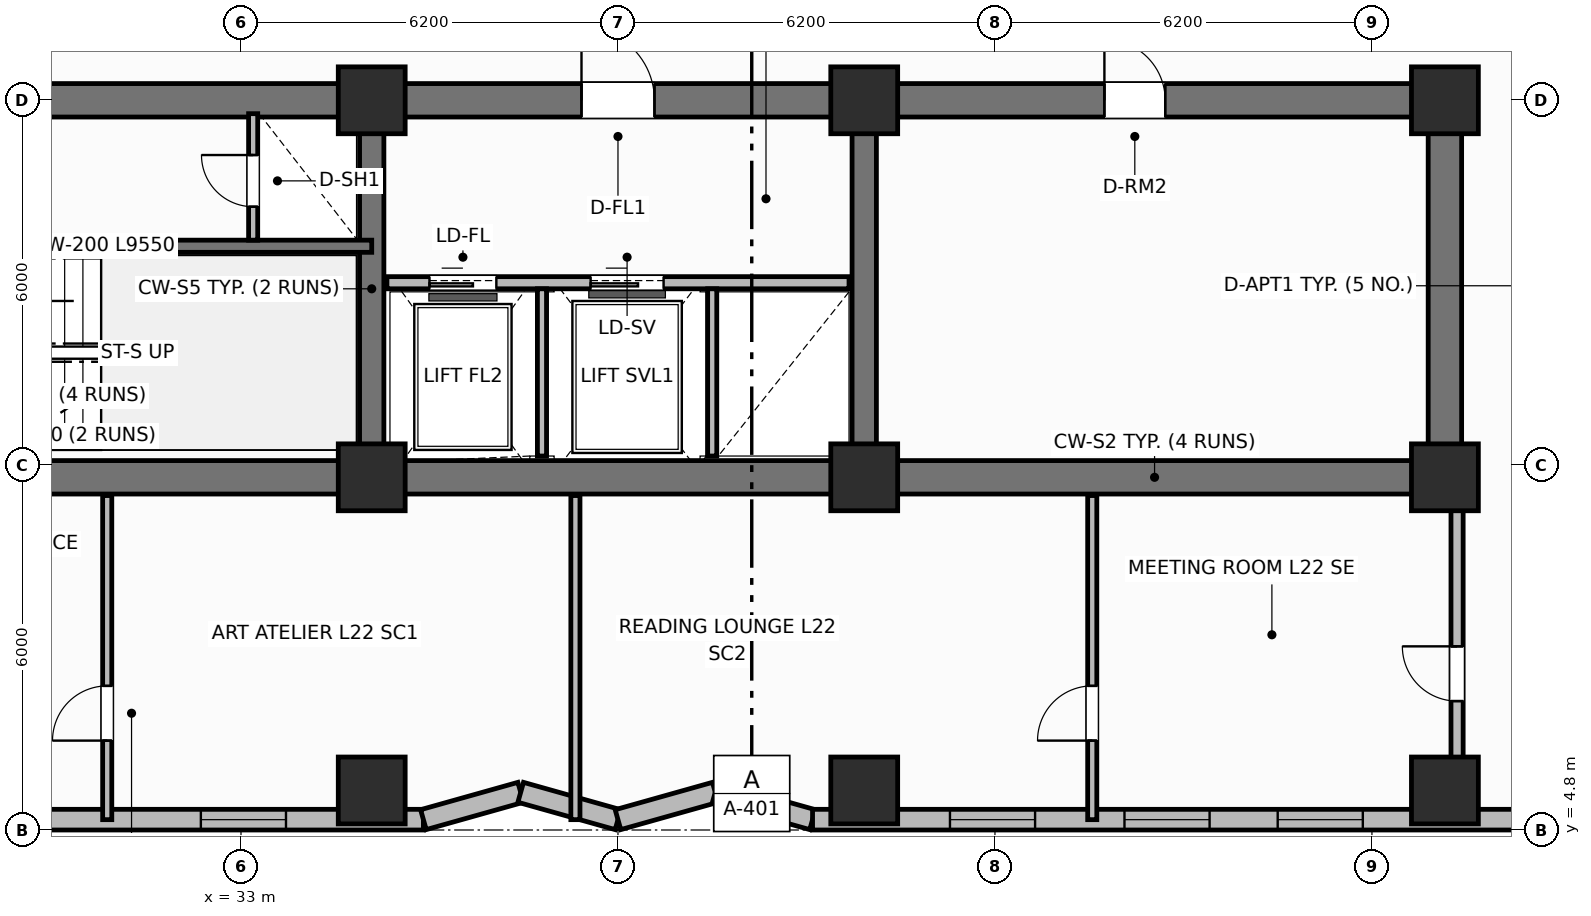
"""IFC4 building model, lengths in metres.
Left out: names, types, materials, properties, quantities, classifications, styles, units other than length and angle.
Written with IfcOpenShell. Run it as: python <this file> out.ifc"""

import sys

from ifc_helpers import new_model, si_unit, direction, frame, frame_2d, origin, origin_2d, place, context, subcontext, project, spatial, rectangle, extrude, element, fill, save


model = new_model("IFC4")
c1 = context("Model", 3, precision=1e-05, world=origin(), true_north=direction((0.0, 1.0)))
c2 = subcontext(c1, "Body", "Model", "MODEL_VIEW")
j1 = project(units=[si_unit("LENGTHUNIT", "METRE"), si_unit("PLANEANGLEUNIT", "RADIAN")], contexts=[c1])
p1 = place(None, origin())
s1 = spatial("IfcSite", under=j1, at=p1, CompositionType="ELEMENT")
p2 = place(p1, origin())
s2 = spatial("IfcBuilding", under=s1, at=p2, CompositionType="ELEMENT")
p3 = place(p2, frame((0.0, 0.0, 92.0)))
s3 = spatial("IfcBuildingStorey", under=s2, at=p3, CompositionType="ELEMENT", Elevation=92.0)
p4 = place(p3, frame((52.8, 10.6, 0.0), z_axis=(0.0, 0.0, 1.0), x_axis=(-1.0, 0.0, 0.0)))
e1 = element("IfcWall", 1, at=p4, inside=s3, PredefinedType="SHEAR", context=c2, shape_type="SweptSolid", body=[
    extrude(rectangle(XDim=27.2, YDim=0.55, at=frame_2d((13.6, 0.0))), origin(), (0.0, 0.0, 1.0), 3.7),
])
p5 = place(p3, frame((52.8, 10.875, 0.0), z_axis=(0.0, 0.0, 1.0), x_axis=(0.0, 1.0, 0.0)))
e2 = element("IfcWall", 2, at=p5, inside=s3, PredefinedType="SHEAR", context=c2, shape_type="SweptSolid", body=[
    extrude(rectangle(XDim=5.65, YDim=0.55, at=frame_2d((2.825, 0.0))), origin(), (0.0, 0.0, 1.0), 3.7),
])
p6 = place(p3, frame((25.6, 16.8, 0.0), z_axis=(0.0, 0.0, 1.0), x_axis=(1.0, 0.0, 0.0)))
e3 = element("IfcWall", 3, at=p6, inside=s3, PredefinedType="SHEAR", context=c2, shape_type="SweptSolid", body=[
    extrude(rectangle(XDim=27.2, YDim=0.55, at=frame_2d((13.6, 0.0))), origin(), (0.0, 0.0, 1.0), 3.7),
])
p7 = place(p6, frame((1.9, 0.0, 0.0)))
e4 = element("IfcOpeningElement", 4, at=p7, cuts=e3, PredefinedType="OPENING", context=c2, shape_type="SweptSolid", body=[
    extrude(rectangle(XDim=1.1, YDim=2.15, at=frame_2d((0.55, 1.075))), frame((0.0, 0.285, 0.0), z_axis=(0.0, -1.0, 0.0), x_axis=(1.0, 0.0, 0.0)), (0.0, 0.0, 1.0), 0.57),
])
p8 = place(p6, frame((13.0, 0.0, 0.0)))
e5 = element("IfcOpeningElement", 5, at=p8, cuts=e3, PredefinedType="OPENING", context=c2, shape_type="SweptSolid", body=[
    extrude(rectangle(XDim=1.2, YDim=2.15, at=frame_2d((0.6, 1.075))), frame((0.0, 0.285, 0.0), z_axis=(0.0, -1.0, 0.0), x_axis=(1.0, 0.0, 0.0)), (0.0, 0.0, 1.0), 0.57),
])
p9 = place(p6, frame((21.6, 0.0, 0.0)))
e6 = element("IfcOpeningElement", 6, at=p9, cuts=e3, PredefinedType="OPENING", context=c2, shape_type="SweptSolid", body=[
    extrude(rectangle(XDim=1.0, YDim=2.15, at=frame_2d((0.5, 1.075))), frame((0.0, 0.285, 0.0), z_axis=(0.0, -1.0, 0.0), x_axis=(1.0, 0.0, 0.0)), (0.0, 0.0, 1.0), 0.57),
])
for number, where, z_axis, x_axis in (
    (7, (35.15, 10.875, 0.0), (0.0, 0.0, 1.0), (0.0, 1.0, 0.0)),
    (8, (43.25, 10.875, 0.0), (0.0, 0.0, 1.0), (0.0, 1.0, 0.0)),
):
    element("IfcWall", number, at=place(p3, frame(where, z_axis=z_axis, x_axis=x_axis)), inside=s3, PredefinedType="SHEAR", context=c2, shape_type="SweptSolid", body=[
        extrude(rectangle(XDim=5.65, YDim=0.4, at=frame_2d((2.825, 0.0))), origin(), (0.0, 0.0, 1.0), 3.7),
    ])
for number, where, z_axis, x_axis in (
    (9, (35.15, 10.6, 0.0), (0.0, 0.0, 1.0), (1.0, 0.0, 0.0)),
    (10, (35.15, 16.8, 0.0), (0.0, 0.0, 1.0), (1.0, 0.0, 0.0)),
    (11, (43.25, 10.6, 0.0), (0.0, 0.0, 1.0), (1.0, 0.0, 0.0)),
    (12, (43.25, 16.8, 0.0), (0.0, 0.0, 1.0), (1.0, 0.0, 0.0)),
    (13, (52.8, 10.6, 0.0), (0.0, 0.0, 1.0), (1.0, 0.0, 0.0)),
    (14, (52.8, 16.8, 0.0), (0.0, 0.0, 1.0), (1.0, 0.0, 0.0)),
    (15, (35.15, 5.45, 0.0), (0.0, 0.0, 1.0), (1.0, 0.0, 0.0)),
    (16, (43.25, 5.45, 0.0), (0.0, 0.0, 1.0), (1.0, 0.0, 0.0)),
    (17, (52.8, 5.45, 0.0), (0.0, 0.0, 1.0), (1.0, 0.0, 0.0)),
):
    element("IfcColumn", number, at=place(p3, frame(where, z_axis=z_axis, x_axis=x_axis)), inside=s3, PredefinedType="COLUMN", context=c2, shape_type="SweptSolid", body=[
        extrude(rectangle(XDim=1.1, YDim=1.1, at=origin_2d()), origin(), (0.0, 0.0, 1.0), 3.7),
    ])
p10 = place(p3, frame((18.6, 4.97, 0.0), z_axis=(0.0, 0.0, 1.0), x_axis=(1.0, 0.0, 0.0)))
e18 = element("IfcWall", 18, at=p10, inside=s3, PredefinedType="SOLIDWALL", context=c2, shape_type="SweptSolid", body=[
    extrude(rectangle(XDim=17.4, YDim=0.34, at=frame_2d((8.7, 0.0))), origin(), (0.0, 0.0, 1.0), 2.7),
])
p11 = place(p10, frame((1.56, 0.0, 0.73)))
e19 = element("IfcOpeningElement", 19, at=p11, cuts=e18, PredefinedType="OPENING", context=c2, shape_type="SweptSolid", body=[
    extrude(rectangle(XDim=1.4, YDim=1.85, at=frame_2d((0.7, 0.925))), frame((0.0, 0.18, 0.0), z_axis=(0.0, -1.0, 0.0), x_axis=(1.0, 0.0, 0.0)), (0.0, 0.0, 1.0), 0.36),
])
p12 = place(p10, frame((8.35, 0.0, 0.73)))
e20 = element("IfcOpeningElement", 20, at=p12, cuts=e18, PredefinedType="OPENING", context=c2, shape_type="SweptSolid", body=[
    extrude(rectangle(XDim=1.4, YDim=1.85, at=frame_2d((0.7, 0.925))), frame((0.0, 0.18, 0.0), z_axis=(0.0, -1.0, 0.0), x_axis=(1.0, 0.0, 0.0)), (0.0, 0.0, 1.0), 0.36),
])
p13 = place(p10, frame((13.74, 0.0, 0.73)))
e21 = element("IfcOpeningElement", 21, at=p13, cuts=e18, PredefinedType="OPENING", context=c2, shape_type="SweptSolid", body=[
    extrude(rectangle(XDim=1.4, YDim=1.85, at=frame_2d((0.7, 0.925))), frame((0.0, 0.18, 0.0), z_axis=(0.0, -1.0, 0.0), x_axis=(1.0, 0.0, 0.0)), (0.0, 0.0, 1.0), 0.36),
])
p14 = place(p3, frame((36.0, 4.97, 0.0), z_axis=(0.0, 0.0, 1.0), x_axis=(0.962662902433, 0.270703040766, 0.0)))
e22 = element("IfcWall", 22, at=p14, inside=s3, PredefinedType="SOLIDWALL", context=c2, shape_type="SweptSolid", body=[
    extrude(rectangle(XDim=1.662, YDim=0.34, at=frame_2d((0.831, 0.0))), origin(), (0.0, 0.0, 1.0), 2.7),
])
p15 = place(p3, frame((37.6, 5.42, 0.0), z_axis=(0.0, 0.0, 1.0), x_axis=(0.962652136636, -0.270741322725, 0.0)))
e23 = element("IfcWall", 23, at=p15, inside=s3, PredefinedType="SOLIDWALL", context=c2, shape_type="SweptSolid", body=[
    extrude(rectangle(XDim=1.662, YDim=0.34, at=frame_2d((0.831, 0.0))), origin(), (0.0, 0.0, 1.0), 2.7),
])
p16 = place(p3, frame((39.2, 4.97, 0.0), z_axis=(0.0, 0.0, 1.0), x_axis=(0.962662902433, 0.270703040766, 0.0)))
e24 = element("IfcWall", 24, at=p16, inside=s3, PredefinedType="SOLIDWALL", context=c2, shape_type="SweptSolid", body=[
    extrude(rectangle(XDim=1.662, YDim=0.34, at=frame_2d((0.831, 0.0))), origin(), (0.0, 0.0, 1.0), 2.7),
])
p17 = place(p3, frame((40.8, 5.42, 0.0), z_axis=(0.0, 0.0, 1.0), x_axis=(0.962652136636, -0.270741322725, 0.0)))
e25 = element("IfcWall", 25, at=p17, inside=s3, PredefinedType="SOLIDWALL", context=c2, shape_type="SweptSolid", body=[
    extrude(rectangle(XDim=1.662, YDim=0.34, at=frame_2d((0.831, 0.0))), origin(), (0.0, 0.0, 1.0), 2.7),
])
p18 = place(p3, frame((42.4, 4.97, 0.0), z_axis=(0.0, 0.0, 1.0), x_axis=(1.0, 0.0, 0.0)))
e26 = element("IfcWall", 26, at=p18, inside=s3, PredefinedType="SOLIDWALL", context=c2, shape_type="SweptSolid", body=[
    extrude(rectangle(XDim=17.4, YDim=0.34, at=frame_2d((8.7, 0.0))), origin(), (0.0, 0.0, 1.0), 2.7),
])
p19 = place(p18, frame((2.26, 0.0, 0.73)))
e27 = element("IfcOpeningElement", 27, at=p19, cuts=e26, PredefinedType="OPENING", context=c2, shape_type="SweptSolid", body=[
    extrude(rectangle(XDim=1.4, YDim=1.85, at=frame_2d((0.7, 0.925))), frame((0.0, 0.18, 0.0), z_axis=(0.0, -1.0, 0.0), x_axis=(1.0, 0.0, 0.0)), (0.0, 0.0, 1.0), 0.36),
])
p20 = place(p18, frame((5.13, 0.0, 0.73)))
e28 = element("IfcOpeningElement", 28, at=p20, cuts=e26, PredefinedType="OPENING", context=c2, shape_type="SweptSolid", body=[
    extrude(rectangle(XDim=1.4, YDim=1.85, at=frame_2d((0.7, 0.925))), frame((0.0, 0.18, 0.0), z_axis=(0.0, -1.0, 0.0), x_axis=(1.0, 0.0, 0.0)), (0.0, 0.0, 1.0), 0.36),
])
p21 = place(p18, frame((7.65, 0.0, 0.73)))
e29 = element("IfcOpeningElement", 29, at=p21, cuts=e26, PredefinedType="OPENING", context=c2, shape_type="SweptSolid", body=[
    extrude(rectangle(XDim=1.4, YDim=1.85, at=frame_2d((0.7, 0.925))), frame((0.0, 0.18, 0.0), z_axis=(0.0, -1.0, 0.0), x_axis=(1.0, 0.0, 0.0)), (0.0, 0.0, 1.0), 0.36),
])
p22 = place(p18, frame((14.44, 0.0, 0.73)))
e30 = element("IfcOpeningElement", 30, at=p22, cuts=e26, PredefinedType="OPENING", context=c2, shape_type="SweptSolid", body=[
    extrude(rectangle(XDim=1.4, YDim=1.85, at=frame_2d((0.7, 0.925))), frame((0.0, 0.18, 0.0), z_axis=(0.0, -1.0, 0.0), x_axis=(1.0, 0.0, 0.0)), (0.0, 0.0, 1.0), 0.36),
])
p23 = place(p3, frame((25.6, 14.4, 0.0), z_axis=(0.0, 0.0, 1.0), x_axis=(1.0, 0.0, 0.0)))
e31 = element("IfcWall", 31, at=p23, inside=s3, PredefinedType="SHEAR", context=c2, shape_type="SweptSolid", body=[
    extrude(rectangle(XDim=9.55, YDim=0.2, at=frame_2d((4.775, 0.0))), origin(), (0.0, 0.0, 1.0), 3.7),
])
p24 = place(p23, frame((1.05, 0.0, 0.0)))
e32 = element("IfcOpeningElement", 32, at=p24, cuts=e31, PredefinedType="OPENING", context=c2, shape_type="SweptSolid", body=[
    extrude(rectangle(XDim=1.1, YDim=2.15, at=frame_2d((0.55, 1.075))), frame((0.0, 0.11, 0.0), z_axis=(0.0, -1.0, 0.0), x_axis=(1.0, 0.0, 0.0)), (0.0, 0.0, 1.0), 0.22),
])
p25 = place(p3, frame((33.2, 14.5, 0.0), z_axis=(0.0, 0.0, 1.0), x_axis=(0.0, 1.0, 0.0)))
e33 = element("IfcWall", 33, at=p25, inside=s3, PredefinedType="PARTITIONING", context=c2, shape_type="SweptSolid", body=[
    extrude(rectangle(XDim=2.08, YDim=0.15, at=frame_2d((1.04, 0.0))), origin(), (0.0, 0.0, 1.0), 2.53),
])
p26 = place(p25, frame((0.55, 0.0, 0.0)))
e34 = element("IfcOpeningElement", 34, at=p26, cuts=e33, PredefinedType="OPENING", context=c2, shape_type="SweptSolid", body=[
    extrude(rectangle(XDim=0.85, YDim=2.05, at=frame_2d((0.425, 1.025))), frame((0.0, 0.085, 0.0), z_axis=(0.0, -1.0, 0.0), x_axis=(1.0, 0.0, 0.0)), (0.0, 0.0, 1.0), 0.17),
])
p27 = place(p3, frame((35.4, 13.8, 0.0), z_axis=(0.0, 0.0, 1.0), x_axis=(1.0, 0.0, 0.0)))
e35 = element("IfcWall", 35, at=p27, inside=s3, PredefinedType="PARTITIONING", context=c2, shape_type="SweptSolid", body=[
    extrude(rectangle(XDim=7.6, YDim=0.2, at=frame_2d((3.8, 0.0))), origin(), (0.0, 0.0, 1.0), 2.3),
])
p28 = place(p27, frame((0.7, 0.0, 0.0)))
e36 = element("IfcOpeningElement", 36, at=p28, cuts=e35, PredefinedType="OPENING", context=c2, shape_type="SweptSolid", body=[
    extrude(rectangle(XDim=1.1, YDim=2.15, at=frame_2d((0.55, 1.075))), frame((0.0, 0.11, 0.0), z_axis=(0.0, -1.0, 0.0), x_axis=(1.0, 0.0, 0.0)), (0.0, 0.0, 1.0), 0.22),
])
p29 = place(p27, frame((3.35, 0.0, 0.0)))
e37 = element("IfcOpeningElement", 37, at=p29, cuts=e35, PredefinedType="OPENING", context=c2, shape_type="SweptSolid", body=[
    extrude(rectangle(XDim=1.2, YDim=2.15, at=frame_2d((0.6, 1.075))), frame((0.0, 0.11, 0.0), z_axis=(0.0, -1.0, 0.0), x_axis=(1.0, 0.0, 0.0)), (0.0, 0.0, 1.0), 0.22),
])
for number, where, z_axis, x_axis in (
    (38, (37.95, 10.95, 0.0), (0.0, 0.0, 1.0), (0.0, 1.0, 0.0)),
    (39, (40.75, 10.95, 0.0), (0.0, 0.0, 1.0), (0.0, 1.0, 0.0)),
):
    element("IfcWall", number, at=place(p3, frame(where, z_axis=z_axis, x_axis=x_axis)), inside=s3, PredefinedType="PARTITIONING", context=c2, shape_type="SweptSolid", body=[
        extrude(rectangle(XDim=2.75, YDim=0.15, at=frame_2d((1.375, 0.0))), origin(), (0.0, 0.0, 1.0), 2.53),
    ])
p30 = place(p3, frame((30.8, 4.97, 0.0), z_axis=(0.0, 0.0, 1.0), x_axis=(0.0, 1.0, 0.0)))
e40 = element("IfcWall", 40, at=p30, inside=s3, PredefinedType="PARTITIONING", context=c2, shape_type="SweptSolid", body=[
    extrude(rectangle(XDim=5.33, YDim=0.15, at=frame_2d((2.665, 0.0))), origin(), (0.0, 0.0, 1.0), 2.53),
])
p31 = place(p30, frame((1.3, 0.0, 0.0)))
e41 = element("IfcOpeningElement", 41, at=p31, cuts=e40, PredefinedType="OPENING", context=c2, shape_type="SweptSolid", body=[
    extrude(rectangle(XDim=0.9, YDim=2.1, at=frame_2d((0.45, 1.05))), frame((0.0, 0.085, 0.0), z_axis=(0.0, -1.0, 0.0), x_axis=(1.0, 0.0, 0.0)), (0.0, 0.0, 1.0), 0.17),
])
p32 = place(p3, frame((38.5, 4.97, 0.0), z_axis=(0.0, 0.0, 1.0), x_axis=(0.0, 1.0, 0.0)))
e42 = element("IfcWall", 42, at=p32, inside=s3, PredefinedType="PARTITIONING", context=c2, shape_type="SweptSolid", body=[
    extrude(rectangle(XDim=5.33, YDim=0.15, at=frame_2d((2.665, 0.0))), origin(), (0.0, 0.0, 1.0), 2.53),
])
p33 = place(p3, frame((47.0, 4.97, 0.0), z_axis=(0.0, 0.0, 1.0), x_axis=(0.0, 1.0, 0.0)))
e43 = element("IfcWall", 43, at=p33, inside=s3, PredefinedType="PARTITIONING", context=c2, shape_type="SweptSolid", body=[
    extrude(rectangle(XDim=5.33, YDim=0.15, at=frame_2d((2.665, 0.0))), origin(), (0.0, 0.0, 1.0), 2.53),
])
p34 = place(p33, frame((1.3, 0.0, 0.0)))
e44 = element("IfcOpeningElement", 44, at=p34, cuts=e43, PredefinedType="OPENING", context=c2, shape_type="SweptSolid", body=[
    extrude(rectangle(XDim=0.9, YDim=2.1, at=frame_2d((0.45, 1.05))), frame((0.0, 0.085, 0.0), z_axis=(0.0, -1.0, 0.0), x_axis=(1.0, 0.0, 0.0)), (0.0, 0.0, 1.0), 0.17),
])
p35 = place(p3, frame((53.0, 5.62, 0.0), z_axis=(0.0, 0.0, 1.0), x_axis=(0.0, 1.0, 0.0)))
e45 = element("IfcWall", 45, at=p35, inside=s3, PredefinedType="PARTITIONING", context=c2, shape_type="SweptSolid", body=[
    extrude(rectangle(XDim=4.68, YDim=0.2, at=frame_2d((2.34, 0.0))), origin(), (0.0, 0.0, 1.0), 2.53),
])
p36 = place(p35, frame((1.3, 0.0, 0.0)))
e46 = element("IfcOpeningElement", 46, at=p36, cuts=e45, PredefinedType="OPENING", context=c2, shape_type="SweptSolid", body=[
    extrude(rectangle(XDim=0.9, YDim=2.1, at=frame_2d((0.45, 1.05))), frame((0.0, 0.11, 0.0), z_axis=(0.0, -1.0, 0.0), x_axis=(1.0, 0.0, 0.0)), (0.0, 0.0, 1.0), 0.22),
])
p37 = place(p13, origin())
e47 = element("IfcWindow", 47, at=p37, inside=s3, PartitioningType="SINGLE_PANEL", PredefinedType="WINDOW", context=c2, shape_type="SweptSolid", body=[
    extrude(rectangle(XDim=1.4, YDim=1.85, at=frame_2d((0.7, 0.925))), frame((0.0, 0.03, 0.0), z_axis=(0.0, -1.0, 0.0), x_axis=(1.0, 0.0, 0.0)), (0.0, 0.0, 1.0), 0.06),
])
fill(e21, e47)
p38 = place(p19, origin())
e48 = element("IfcWindow", 48, at=p38, inside=s3, PartitioningType="SINGLE_PANEL", PredefinedType="WINDOW", context=c2, shape_type="SweptSolid", body=[
    extrude(rectangle(XDim=1.4, YDim=1.85, at=frame_2d((0.7, 0.925))), frame((0.0, 0.03, 0.0), z_axis=(0.0, -1.0, 0.0), x_axis=(1.0, 0.0, 0.0)), (0.0, 0.0, 1.0), 0.06),
])
fill(e27, e48)
p39 = place(p20, origin())
e49 = element("IfcWindow", 49, at=p39, inside=s3, PartitioningType="SINGLE_PANEL", PredefinedType="WINDOW", context=c2, shape_type="SweptSolid", body=[
    extrude(rectangle(XDim=1.4, YDim=1.85, at=frame_2d((0.7, 0.925))), frame((0.0, 0.03, 0.0), z_axis=(0.0, -1.0, 0.0), x_axis=(1.0, 0.0, 0.0)), (0.0, 0.0, 1.0), 0.06),
])
fill(e28, e49)
p40 = place(p21, origin())
e50 = element("IfcWindow", 50, at=p40, inside=s3, PartitioningType="SINGLE_PANEL", PredefinedType="WINDOW", context=c2, shape_type="SweptSolid", body=[
    extrude(rectangle(XDim=1.4, YDim=1.85, at=frame_2d((0.7, 0.925))), frame((0.0, 0.03, 0.0), z_axis=(0.0, -1.0, 0.0), x_axis=(1.0, 0.0, 0.0)), (0.0, 0.0, 1.0), 0.06),
])
fill(e29, e50)
p41 = place(p26, origin())
e51 = element("IfcDoor", 51, at=p41, inside=s3, OperationType="SINGLE_SWING_RIGHT", PredefinedType="TRAPDOOR", context=c2, shape_type="SweptSolid", body=[
    extrude(rectangle(XDim=0.85, YDim=2.05, at=frame_2d((0.425, 1.025))), frame((0.0, 0.025, 0.0), z_axis=(0.0, -1.0, 0.0), x_axis=(1.0, 0.0, 0.0)), (0.0, 0.0, 1.0), 0.05),
])
fill(e34, e51)
p42 = place(p28, origin())
e52 = element("IfcDoor", 52, at=p42, inside=s3, OperationType="SLIDING_TO_LEFT", PredefinedType="DOOR", context=c2, shape_type="SweptSolid", body=[
    extrude(rectangle(XDim=1.1, YDim=2.15, at=frame_2d((0.55, 1.075))), frame((0.0, 0.025, 0.0), z_axis=(0.0, -1.0, 0.0), x_axis=(1.0, 0.0, 0.0)), (0.0, 0.0, 1.0), 0.05),
])
fill(e36, e52)
p43 = place(p29, origin())
e53 = element("IfcDoor", 53, at=p43, inside=s3, OperationType="SLIDING_TO_LEFT", PredefinedType="DOOR", context=c2, shape_type="SweptSolid", body=[
    extrude(rectangle(XDim=1.2, YDim=2.15, at=frame_2d((0.6, 1.075))), frame((0.0, 0.025, 0.0), z_axis=(0.0, -1.0, 0.0), x_axis=(1.0, 0.0, 0.0)), (0.0, 0.0, 1.0), 0.05),
])
fill(e37, e53)
p44 = place(p31, origin())
e54 = element("IfcDoor", 54, at=p44, inside=s3, OperationType="SINGLE_SWING_LEFT", PredefinedType="DOOR", context=c2, shape_type="SweptSolid", body=[
    extrude(rectangle(XDim=0.9, YDim=2.1, at=frame_2d((0.45, 1.05))), frame((0.0, 0.025, 0.0), z_axis=(0.0, -1.0, 0.0), x_axis=(1.0, 0.0, 0.0)), (0.0, 0.0, 1.0), 0.05),
])
fill(e41, e54)
p45 = place(p34, origin())
e55 = element("IfcDoor", 55, at=p45, inside=s3, OperationType="SINGLE_SWING_LEFT", PredefinedType="DOOR", context=c2, shape_type="SweptSolid", body=[
    extrude(rectangle(XDim=0.9, YDim=2.1, at=frame_2d((0.45, 1.05))), frame((0.0, 0.025, 0.0), z_axis=(0.0, -1.0, 0.0), x_axis=(1.0, 0.0, 0.0)), (0.0, 0.0, 1.0), 0.05),
])
fill(e44, e55)
p46 = place(p36, origin())
e56 = element("IfcDoor", 56, at=p46, inside=s3, OperationType="SINGLE_SWING_RIGHT", PredefinedType="DOOR", context=c2, shape_type="SweptSolid", body=[
    extrude(rectangle(XDim=0.9, YDim=2.1, at=frame_2d((0.45, 1.05))), frame((0.0, 0.025, 0.0), z_axis=(0.0, -1.0, 0.0), x_axis=(1.0, 0.0, 0.0)), (0.0, 0.0, 1.0), 0.05),
])
fill(e46, e56)
p47 = place(p8, origin())
e57 = element("IfcDoor", 57, at=p47, inside=s3, OperationType="SINGLE_SWING_LEFT", PredefinedType="DOOR", context=c2, shape_type="SweptSolid", body=[
    extrude(rectangle(XDim=1.2, YDim=2.15, at=frame_2d((0.6, 1.075))), frame((0.0, 0.025, 0.0), z_axis=(0.0, -1.0, 0.0), x_axis=(1.0, 0.0, 0.0)), (0.0, 0.0, 1.0), 0.05),
])
fill(e5, e57)
p48 = place(p9, origin())
e58 = element("IfcDoor", 58, at=p48, inside=s3, OperationType="SINGLE_SWING_LEFT", PredefinedType="DOOR", context=c2, shape_type="SweptSolid", body=[
    extrude(rectangle(XDim=1.0, YDim=2.15, at=frame_2d((0.5, 1.075))), frame((0.0, 0.025, 0.0), z_axis=(0.0, -1.0, 0.0), x_axis=(1.0, 0.0, 0.0)), (0.0, 0.0, 1.0), 0.05),
])
fill(e6, e58)
save(model, sys.argv[1])
